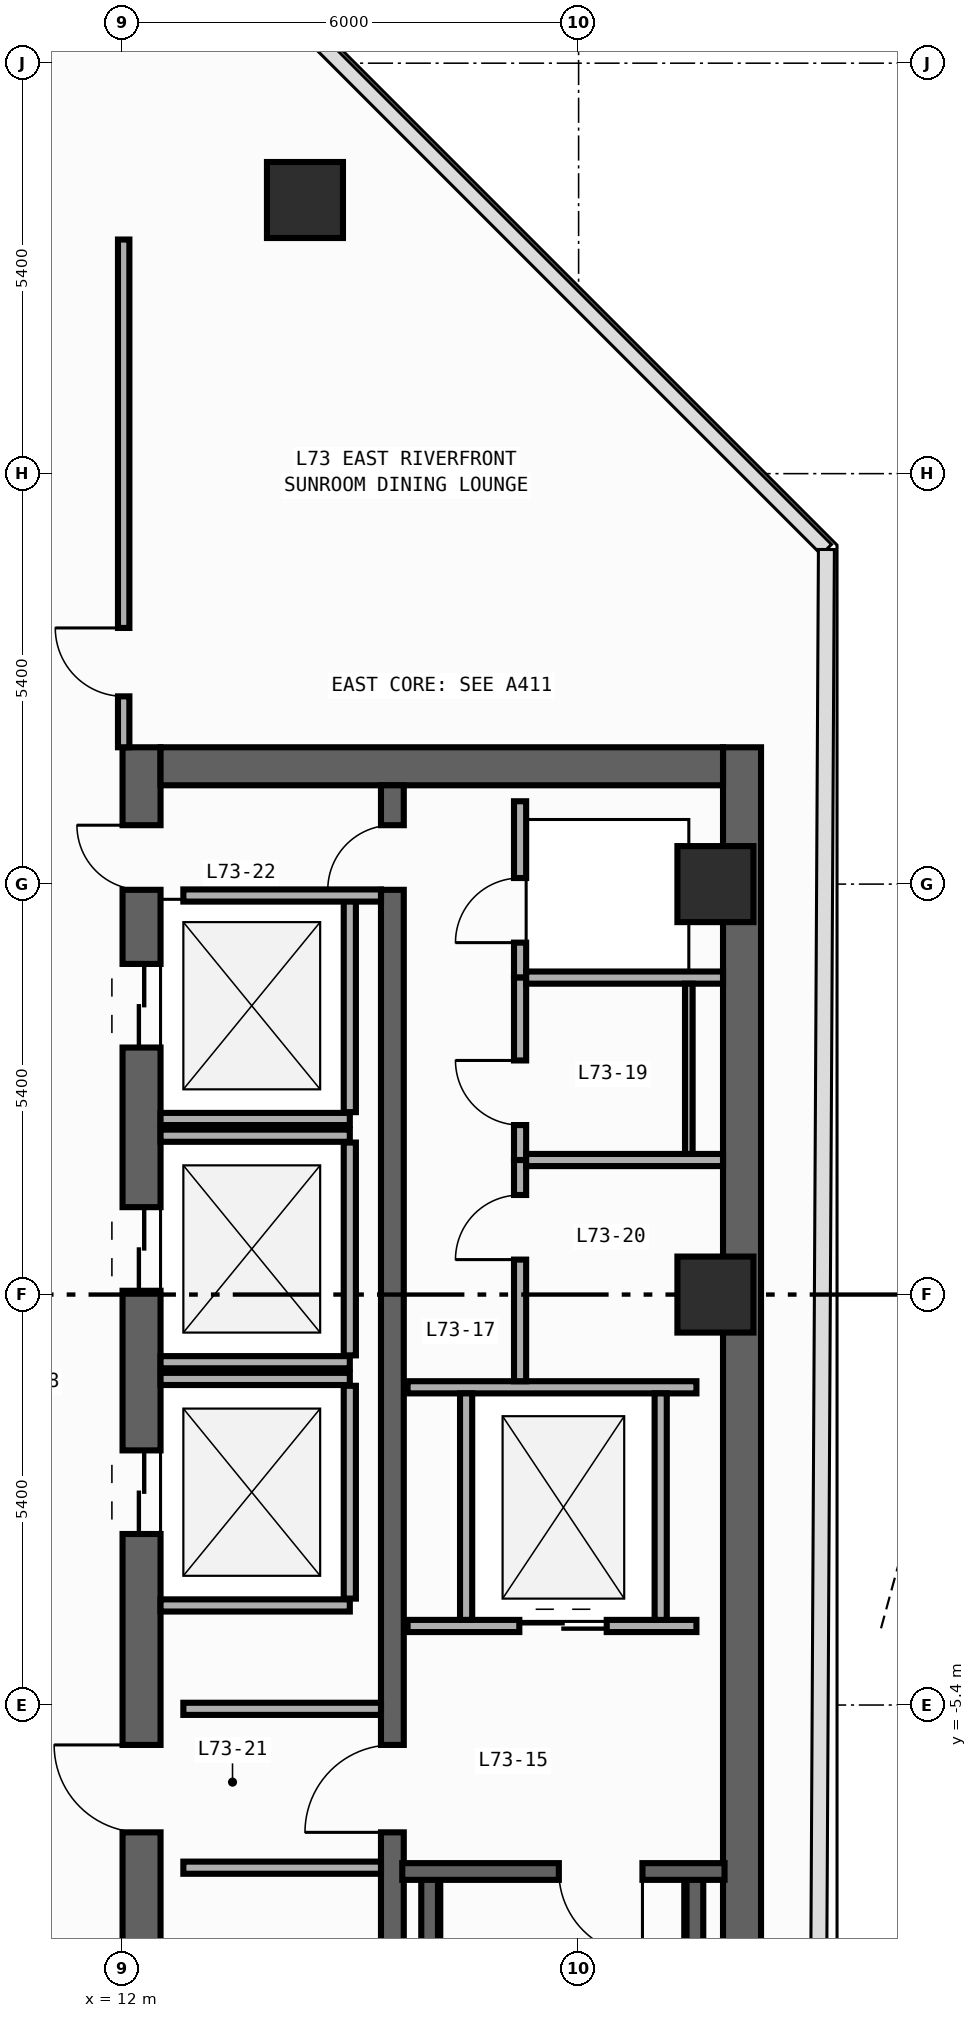
"""IFC4 building model, lengths in metres.
Left out: names, types, materials, properties, quantities, classifications, styles, units other than length and angle.
Written with IfcOpenShell. Run it as: python <this file> out.ifc"""

import sys

from ifc_helpers import new_model, si_unit, direction, frame, frame_2d, origin, origin_2d, place, context, subcontext, project, spatial, rectangle, circle, extrude, element, fill, save


model = new_model("IFC4")
c1 = context("Model", 3, precision=1e-05, world=origin(), true_north=direction((0.0, 1.0)))
c2 = subcontext(c1, "Body", "Model", "MODEL_VIEW")
j1 = project(units=[si_unit("LENGTHUNIT", "METRE"), si_unit("PLANEANGLEUNIT", "RADIAN")], contexts=[c1])
p1 = place(None, origin())
s1 = spatial("IfcSite", under=j1, at=p1, CompositionType="ELEMENT")
p2 = place(p1, origin())
s2 = spatial("IfcBuilding", under=s1, at=p2, CompositionType="ELEMENT")
p3 = place(p2, frame((0.0, 0.0, 304.2)))
s3 = spatial("IfcBuildingStorey", under=s2, at=p3, CompositionType="ELEMENT", Elevation=304.2)
p4 = place(p3, frame((12.25, -19.8, 0.0), z_axis=(0.0, 0.0, 1.0), x_axis=(0.0, 1.0, 0.0)))
e1 = element("IfcWall", 1, at=p4, inside=s3, PredefinedType="SHEAR", context=c2, shape_type="SweptSolid", body=[
    extrude(rectangle(XDim=27.0, YDim=0.5, at=frame_2d((13.5, 0.0))), origin(), (0.0, 0.0, 1.0), 3.54),
])
p5 = place(p4, frame((23.05, 0.0, 0.0)))
e2 = element("IfcOpeningElement", 2, at=p5, cuts=e1, PredefinedType="OPENING", context=c2, shape_type="SweptSolid", body=[
    extrude(rectangle(XDim=1.1, YDim=2.2, at=frame_2d((0.55, 1.1))), frame((0.0, 0.26, 0.0), z_axis=(0.0, -1.0, 0.0), x_axis=(1.0, 0.0, 0.0)), (0.0, 0.0, 1.0), 0.52),
])
p6 = place(p4, frame((19.85, 0.0, 0.0)))
e3 = element("IfcOpeningElement", 3, at=p6, cuts=e1, PredefinedType="OPENING", context=c2, shape_type="SweptSolid", body=[
    extrude(rectangle(XDim=1.1, YDim=2.2, at=frame_2d((0.55, 1.1))), frame((0.0, 0.26, 0.0), z_axis=(0.0, -1.0, 0.0), x_axis=(1.0, 0.0, 0.0)), (0.0, 0.0, 1.0), 0.52),
])
p7 = place(p4, frame((16.65, 0.0, 0.0)))
e4 = element("IfcOpeningElement", 4, at=p7, cuts=e1, PredefinedType="OPENING", context=c2, shape_type="SweptSolid", body=[
    extrude(rectangle(XDim=1.1, YDim=2.2, at=frame_2d((0.55, 1.1))), frame((0.0, 0.26, 0.0), z_axis=(0.0, -1.0, 0.0), x_axis=(1.0, 0.0, 0.0)), (0.0, 0.0, 1.0), 0.52),
])
p8 = place(p4, frame((10.175, 0.0, 0.0)))
e5 = element("IfcOpeningElement", 5, at=p8, cuts=e1, PredefinedType="OPENING", context=c2, shape_type="SweptSolid", body=[
    extrude(rectangle(XDim=0.85, YDim=2.1, at=frame_2d((0.425, 1.05))), frame((0.0, 0.26, 0.0), z_axis=(0.0, -1.0, 0.0), x_axis=(1.0, 0.0, 0.0)), (0.0, 0.0, 1.0), 0.52),
])
p9 = place(p4, frame((12.725, 0.0, 0.0)))
e6 = element("IfcOpeningElement", 6, at=p9, cuts=e1, PredefinedType="OPENING", context=c2, shape_type="SweptSolid", body=[
    extrude(rectangle(XDim=1.15, YDim=2.2, at=frame_2d((0.575, 1.1))), frame((0.0, 0.26, 0.0), z_axis=(0.0, -1.0, 0.0), x_axis=(1.0, 0.0, 0.0)), (0.0, 0.0, 1.0), 0.52),
])
p10 = place(p4, frame((25.125, 0.0, 0.0)))
e7 = element("IfcOpeningElement", 7, at=p10, cuts=e1, PredefinedType="OPENING", context=c2, shape_type="SweptSolid", body=[
    extrude(rectangle(XDim=0.85, YDim=2.1, at=frame_2d((0.425, 1.05))), frame((0.0, 0.26, 0.0), z_axis=(0.0, -1.0, 0.0), x_axis=(1.0, 0.0, 0.0)), (0.0, 0.0, 1.0), 0.52),
])
p11 = place(p3, frame((20.15, -19.8, 0.0), z_axis=(0.0, 0.0, 1.0), x_axis=(0.0, 1.0, 0.0)))
e8 = element("IfcWall", 8, at=p11, inside=s3, PredefinedType="SHEAR", context=c2, shape_type="SweptSolid", body=[
    extrude(rectangle(XDim=27.0, YDim=0.5, at=frame_2d((13.5, 0.0))), origin(), (0.0, 0.0, 1.0), 3.54),
])
p12 = place(p3, frame((12.5, 6.95, 0.0), z_axis=(0.0, 0.0, 1.0), x_axis=(1.0, 0.0, 0.0)))
e9 = element("IfcWall", 9, at=p12, inside=s3, PredefinedType="SHEAR", context=c2, shape_type="SweptSolid", body=[
    extrude(rectangle(XDim=7.4, YDim=0.5, at=frame_2d((3.7, 0.0))), origin(), (0.0, 0.0, 1.0), 3.54),
])
p13 = place(p3, frame((15.55, -19.3, 0.0), z_axis=(0.0, 0.0, 1.0), x_axis=(0.0, 1.0, 0.0)))
e10 = element("IfcWall", 10, at=p13, inside=s3, PredefinedType="SHEAR", context=c2, shape_type="SweptSolid", body=[
    extrude(rectangle(XDim=26.0, YDim=0.3, at=frame_2d((13.0, 0.0))), origin(), (0.0, 0.0, 1.0), 3.54),
])
p14 = place(p13, frame((12.225, 0.0, 0.0)))
e11 = element("IfcOpeningElement", 11, at=p14, cuts=e10, PredefinedType="OPENING", context=c2, shape_type="SweptSolid", body=[
    extrude(rectangle(XDim=1.15, YDim=2.2, at=frame_2d((0.575, 1.1))), frame((0.0, 0.16, 0.0), z_axis=(0.0, -1.0, 0.0), x_axis=(1.0, 0.0, 0.0)), (0.0, 0.0, 1.0), 0.32),
])
p15 = place(p13, frame((24.625, 0.0, 0.0)))
e12 = element("IfcOpeningElement", 12, at=p15, cuts=e10, PredefinedType="OPENING", context=c2, shape_type="SweptSolid", body=[
    extrude(rectangle(XDim=0.85, YDim=2.1, at=frame_2d((0.425, 1.05))), frame((0.0, 0.16, 0.0), z_axis=(0.0, -1.0, 0.0), x_axis=(1.0, 0.0, 0.0)), (0.0, 0.0, 1.0), 0.32),
])
for number, where, z_axis, x_axis in (
    (13, (16.04, -19.01, 0.0), (0.0, 0.0, 1.0), (0.0, 1.0, 0.0)),
    (14, (19.53, -19.01, 0.0), (0.0, 0.0, 1.0), (0.0, 1.0, 0.0)),
):
    element("IfcWall", number, at=place(p3, frame(where, z_axis=z_axis, x_axis=x_axis)), inside=s3, PredefinedType="SHEAR", context=c2, shape_type="SweptSolid", body=[
        extrude(rectangle(XDim=11.42, YDim=0.22, at=frame_2d((5.71, 0.0))), origin(), (0.0, 0.0, 1.0), 3.54),
    ])
p16 = place(p3, frame((19.92, -7.59, 0.0), z_axis=(0.0, 0.0, 1.0), x_axis=(-1.0, 0.0, 0.0)))
e15 = element("IfcWall", 15, at=p16, inside=s3, PredefinedType="SHEAR", context=c2, shape_type="SweptSolid", body=[
    extrude(rectangle(XDim=4.24, YDim=0.22, at=frame_2d((2.12, 0.0))), origin(), (0.0, 0.0, 1.0), 3.54),
])
p17 = place(p16, frame((1.08, 0.0, 0.0)))
e16 = element("IfcOpeningElement", 16, at=p17, cuts=e15, PredefinedType="OPENING", context=c2, shape_type="SweptSolid", body=[
    extrude(rectangle(XDim=1.1, YDim=2.2, at=frame_2d((0.55, 1.1))), frame((0.0, 0.12, 0.0), z_axis=(0.0, -1.0, 0.0), x_axis=(1.0, 0.0, 0.0)), (0.0, 0.0, 1.0), 0.24),
])
for number, where, z_axis, x_axis in (
    (17, (14.4, 14.4, 0.0), (0.0, 0.0, 1.0), (1.0, 0.0, 0.0)),
    (18, (19.8, 0.0, 0.0), (0.0, 0.0, 1.0), (1.0, 0.0, 0.0)),
    (19, (19.8, 5.4, 0.0), (0.0, 0.0, 1.0), (1.0, 0.0, 0.0)),
):
    element("IfcColumn", number, at=place(p3, frame(where, z_axis=z_axis, x_axis=x_axis)), inside=s3, PredefinedType="COLUMN", context=c2, shape_type="SweptSolid", body=[
        extrude(circle(Radius=0.5, at=origin_2d()), origin(), (0.0, 0.0, 1.0), 3.8),
    ])
p18 = place(p3, frame((12.5, 2.31, 0.0), z_axis=(0.0, 0.0, 1.0), x_axis=(1.0, 0.0, 0.0)))
e20 = element("IfcWall", 20, at=p18, inside=s3, PredefinedType="STANDARD", context=c2, shape_type="SweptSolid", body=[
    extrude(rectangle(XDim=2.49, YDim=0.16, at=frame_2d((1.245, 0.0))), origin(), (0.0, 0.0, 1.0), 3.54),
])
p19 = place(p3, frame((14.99, 2.4, 0.0), z_axis=(0.0, 0.0, 1.0), x_axis=(0.0, 1.0, 0.0)))
e21 = element("IfcWall", 21, at=p19, inside=s3, PredefinedType="STANDARD", context=c2, shape_type="SweptSolid", body=[
    extrude(rectangle(XDim=2.8, YDim=0.16, at=frame_2d((1.4, 0.0))), origin(), (0.0, 0.0, 1.0), 3.54),
])
for number, where, z_axis, x_axis in (
    (22, (12.5, -0.89, 0.0), (0.0, 0.0, 1.0), (1.0, 0.0, 0.0)),
    (23, (12.5, 2.09, 0.0), (0.0, 0.0, 1.0), (1.0, 0.0, 0.0)),
):
    element("IfcWall", number, at=place(p3, frame(where, z_axis=z_axis, x_axis=x_axis)), inside=s3, PredefinedType="STANDARD", context=c2, shape_type="SweptSolid", body=[
        extrude(rectangle(XDim=2.49, YDim=0.16, at=frame_2d((1.245, 0.0))), origin(), (0.0, 0.0, 1.0), 3.54),
    ])
p20 = place(p3, frame((14.99, -0.8, 0.0), z_axis=(0.0, 0.0, 1.0), x_axis=(0.0, 1.0, 0.0)))
e24 = element("IfcWall", 24, at=p20, inside=s3, PredefinedType="STANDARD", context=c2, shape_type="SweptSolid", body=[
    extrude(rectangle(XDim=2.8, YDim=0.16, at=frame_2d((1.4, 0.0))), origin(), (0.0, 0.0, 1.0), 3.54),
])
for number, where, z_axis, x_axis in (
    (25, (12.5, -4.09, 0.0), (0.0, 0.0, 1.0), (1.0, 0.0, 0.0)),
    (26, (12.5, -1.11, 0.0), (0.0, 0.0, 1.0), (1.0, 0.0, 0.0)),
):
    element("IfcWall", number, at=place(p3, frame(where, z_axis=z_axis, x_axis=x_axis)), inside=s3, PredefinedType="STANDARD", context=c2, shape_type="SweptSolid", body=[
        extrude(rectangle(XDim=2.49, YDim=0.16, at=frame_2d((1.245, 0.0))), origin(), (0.0, 0.0, 1.0), 3.54),
    ])
p21 = place(p3, frame((14.99, -4.0, 0.0), z_axis=(0.0, 0.0, 1.0), x_axis=(0.0, 1.0, 0.0)))
e27 = element("IfcWall", 27, at=p21, inside=s3, PredefinedType="STANDARD", context=c2, shape_type="SweptSolid", body=[
    extrude(rectangle(XDim=2.8, YDim=0.16, at=frame_2d((1.4, 0.0))), origin(), (0.0, 0.0, 1.0), 3.54),
])
p22 = place(p3, frame((15.75, -4.36, 0.0), z_axis=(0.0, 0.0, 1.0), x_axis=(1.0, 0.0, 0.0)))
e28 = element("IfcWall", 28, at=p22, inside=s3, PredefinedType="STANDARD", context=c2, shape_type="SweptSolid", body=[
    extrude(rectangle(XDim=3.8, YDim=0.16, at=frame_2d((1.9, 0.0))), origin(), (0.0, 0.0, 1.0), 3.54),
])
p23 = place(p22, frame((1.47, 0.0, 0.0)))
e29 = element("IfcOpeningElement", 29, at=p23, cuts=e28, PredefinedType="OPENING", context=c2, shape_type="SweptSolid", body=[
    extrude(rectangle(XDim=1.15, YDim=2.2, at=frame_2d((0.575, 1.1))), frame((0.0, 0.09, 0.0), z_axis=(0.0, -1.0, 0.0), x_axis=(1.0, 0.0, 0.0)), (0.0, 0.0, 1.0), 0.18),
])
p24 = place(p3, frame((15.75, -1.22, 0.0), z_axis=(0.0, 0.0, 1.0), x_axis=(1.0, 0.0, 0.0)))
e30 = element("IfcWall", 30, at=p24, inside=s3, PredefinedType="STANDARD", context=c2, shape_type="SweptSolid", body=[
    extrude(rectangle(XDim=3.8, YDim=0.16, at=frame_2d((1.9, 0.0))), origin(), (0.0, 0.0, 1.0), 3.54),
])
for number, where, z_axis, x_axis in (
    (31, (16.52, -4.28, 0.0), (0.0, 0.0, 1.0), (0.0, 1.0, 0.0)),
    (32, (19.08, -4.28, 0.0), (0.0, 0.0, 1.0), (0.0, 1.0, 0.0)),
):
    element("IfcWall", number, at=place(p3, frame(where, z_axis=z_axis, x_axis=x_axis)), inside=s3, PredefinedType="STANDARD", context=c2, shape_type="SweptSolid", body=[
        extrude(rectangle(XDim=2.98, YDim=0.16, at=frame_2d((1.49, 0.0))), origin(), (0.0, 0.0, 1.0), 3.54),
    ])
for number, where, z_axis, x_axis in (
    (33, (12.8, -5.45, 0.0), (0.0, 0.0, 1.0), (1.0, 0.0, 0.0)),
    (34, (12.8, -7.54, 0.0), (0.0, 0.0, 1.0), (1.0, 0.0, 0.0)),
    (35, (12.8, 5.25, 0.0), (0.0, 0.0, 1.0), (1.0, 0.0, 0.0)),
):
    element("IfcWall", number, at=place(p3, frame(where, z_axis=z_axis, x_axis=x_axis)), inside=s3, PredefinedType="STANDARD", context=c2, shape_type="SweptSolid", body=[
        extrude(rectangle(XDim=2.6, YDim=0.16, at=frame_2d((1.3, 0.0))), origin(), (0.0, 0.0, 1.0), 3.54),
    ])
p25 = place(p3, frame((17.23, 4.17, 0.0), z_axis=(0.0, 0.0, 1.0), x_axis=(0.0, 1.0, 0.0)))
e36 = element("IfcWall", 36, at=p25, inside=s3, PredefinedType="PARTITIONING", context=c2, shape_type="SweptSolid", body=[
    extrude(rectangle(XDim=2.32, YDim=0.16, at=frame_2d((1.16, 0.0))), origin(), (0.0, 0.0, 1.0), 3.54),
])
p26 = place(p25, frame((0.46, 0.0, 0.0)))
e37 = element("IfcOpeningElement", 37, at=p26, cuts=e36, PredefinedType="OPENING", context=c2, shape_type="SweptSolid", body=[
    extrude(rectangle(XDim=0.85, YDim=2.1, at=frame_2d((0.425, 1.05))), frame((0.0, 0.09, 0.0), z_axis=(0.0, -1.0, 0.0), x_axis=(1.0, 0.0, 0.0)), (0.0, 0.0, 1.0), 0.18),
])
p27 = place(p3, frame((17.23, 1.77, 0.0), z_axis=(0.0, 0.0, 1.0), x_axis=(0.0, 1.0, 0.0)))
e38 = element("IfcWall", 38, at=p27, inside=s3, PredefinedType="PARTITIONING", context=c2, shape_type="SweptSolid", body=[
    extrude(rectangle(XDim=2.4, YDim=0.16, at=frame_2d((1.2, 0.0))), origin(), (0.0, 0.0, 1.0), 3.54),
])
p28 = place(p27, frame((0.46, 0.0, 0.0)))
e39 = element("IfcOpeningElement", 39, at=p28, cuts=e38, PredefinedType="OPENING", context=c2, shape_type="SweptSolid", body=[
    extrude(rectangle(XDim=0.85, YDim=2.1, at=frame_2d((0.425, 1.05))), frame((0.0, 0.09, 0.0), z_axis=(0.0, -1.0, 0.0), x_axis=(1.0, 0.0, 0.0)), (0.0, 0.0, 1.0), 0.18),
])
p29 = place(p3, frame((17.23, -1.14, 0.0), z_axis=(0.0, 0.0, 1.0), x_axis=(0.0, 1.0, 0.0)))
e40 = element("IfcWall", 40, at=p29, inside=s3, PredefinedType="PARTITIONING", context=c2, shape_type="SweptSolid", body=[
    extrude(rectangle(XDim=2.91, YDim=0.16, at=frame_2d((1.455, 0.0))), origin(), (0.0, 0.0, 1.0), 3.54),
])
p30 = place(p29, frame((1.6, 0.0, 0.0)))
e41 = element("IfcOpeningElement", 41, at=p30, cuts=e40, PredefinedType="OPENING", context=c2, shape_type="SweptSolid", body=[
    extrude(rectangle(XDim=0.85, YDim=2.1, at=frame_2d((0.425, 1.05))), frame((0.0, 0.09, 0.0), z_axis=(0.0, -1.0, 0.0), x_axis=(1.0, 0.0, 0.0)), (0.0, 0.0, 1.0), 0.18),
])
for number, where, z_axis, x_axis in (
    (42, (17.31, 4.17, 0.0), (0.0, 0.0, 1.0), (1.0, 0.0, 0.0)),
    (43, (17.31, 1.77, 0.0), (0.0, 0.0, 1.0), (1.0, 0.0, 0.0)),
):
    element("IfcWall", number, at=place(p3, frame(where, z_axis=z_axis, x_axis=x_axis)), inside=s3, PredefinedType="PARTITIONING", context=c2, shape_type="SweptSolid", body=[
        extrude(rectangle(XDim=2.59, YDim=0.16, at=frame_2d((1.295, 0.0))), origin(), (0.0, 0.0, 1.0), 3.54),
    ])
p31 = place(p3, frame((12.015, 7.2, 0.0), z_axis=(0.0, 0.0, 1.0), x_axis=(0.0, 1.0, 0.0)))
e44 = element("IfcWall", 44, at=p31, inside=s3, PredefinedType="PARTITIONING", context=c2, shape_type="SweptSolid", body=[
    extrude(rectangle(XDim=6.68, YDim=0.15, at=frame_2d((3.34, 0.0))), origin(), (0.0, 0.0, 1.0), 3.54),
])
p32 = place(p31, frame((0.67, 0.0, 0.0)))
e45 = element("IfcOpeningElement", 45, at=p32, cuts=e44, PredefinedType="OPENING", context=c2, shape_type="SweptSolid", body=[
    extrude(rectangle(XDim=0.9, YDim=2.15, at=frame_2d((0.45, 1.075))), frame((0.0, 0.085, 0.0), z_axis=(0.0, -1.0, 0.0), x_axis=(1.0, 0.0, 0.0)), (0.0, 0.0, 1.0), 0.17),
])
p33 = place(p3, frame((19.45, 4.09, 0.0), z_axis=(0.0, 0.0, 1.0), x_axis=(0.0, -1.0, 0.0)))
e46 = element("IfcWall", 46, at=p33, inside=s3, PredefinedType="PARTITIONING", context=c2, shape_type="SweptSolid", body=[
    extrude(rectangle(XDim=2.24, YDim=0.1, at=frame_2d((1.12, 0.0))), origin(), (0.0, 0.0, 1.0), 3.54),
])
p34 = place(p17, origin())
e47 = element("IfcDoor", 47, at=p34, inside=s3, OperationType="SINGLE_SWING_LEFT", PredefinedType="DOOR", context=c2, shape_type="SweptSolid", body=[
    extrude(rectangle(XDim=1.1, YDim=2.2, at=frame_2d((0.55, 1.1))), frame((0.0, 0.025, 0.0), z_axis=(0.0, -1.0, 0.0), x_axis=(1.0, 0.0, 0.0)), (0.0, 0.0, 1.0), 0.05),
])
fill(e16, e47)
p35 = place(p5, origin())
e48 = element("IfcDoor", 48, at=p35, inside=s3, OperationType="DOUBLE_DOOR_SLIDING", PredefinedType="DOOR", context=c2, shape_type="SweptSolid", body=[
    extrude(rectangle(XDim=1.1, YDim=2.2, at=frame_2d((0.55, 1.1))), frame((0.0, 0.025, 0.0), z_axis=(0.0, -1.0, 0.0), x_axis=(1.0, 0.0, 0.0)), (0.0, 0.0, 1.0), 0.05),
])
fill(e2, e48)
p36 = place(p6, origin())
e49 = element("IfcDoor", 49, at=p36, inside=s3, OperationType="DOUBLE_DOOR_SLIDING", PredefinedType="DOOR", context=c2, shape_type="SweptSolid", body=[
    extrude(rectangle(XDim=1.1, YDim=2.2, at=frame_2d((0.55, 1.1))), frame((0.0, 0.025, 0.0), z_axis=(0.0, -1.0, 0.0), x_axis=(1.0, 0.0, 0.0)), (0.0, 0.0, 1.0), 0.05),
])
fill(e3, e49)
p37 = place(p7, origin())
e50 = element("IfcDoor", 50, at=p37, inside=s3, OperationType="DOUBLE_DOOR_SLIDING", PredefinedType="DOOR", context=c2, shape_type="SweptSolid", body=[
    extrude(rectangle(XDim=1.1, YDim=2.2, at=frame_2d((0.55, 1.1))), frame((0.0, 0.025, 0.0), z_axis=(0.0, -1.0, 0.0), x_axis=(1.0, 0.0, 0.0)), (0.0, 0.0, 1.0), 0.05),
])
fill(e4, e50)
p38 = place(p9, origin())
e51 = element("IfcDoor", 51, at=p38, inside=s3, OperationType="SINGLE_SWING_RIGHT", PredefinedType="DOOR", context=c2, shape_type="SweptSolid", body=[
    extrude(rectangle(XDim=1.15, YDim=2.2, at=frame_2d((0.575, 1.1))), frame((0.0, 0.025, 0.0), z_axis=(0.0, -1.0, 0.0), x_axis=(1.0, 0.0, 0.0)), (0.0, 0.0, 1.0), 0.05),
])
fill(e6, e51)
p39 = place(p14, origin())
e52 = element("IfcDoor", 52, at=p39, inside=s3, OperationType="SINGLE_SWING_LEFT", PredefinedType="DOOR", context=c2, shape_type="SweptSolid", body=[
    extrude(rectangle(XDim=1.15, YDim=2.2, at=frame_2d((0.575, 1.1))), frame((0.0, 0.025, 0.0), z_axis=(0.0, -1.0, 0.0), x_axis=(1.0, 0.0, 0.0)), (0.0, 0.0, 1.0), 0.05),
])
fill(e11, e52)
p40 = place(p10, origin())
e53 = element("IfcDoor", 53, at=p40, inside=s3, OperationType="SINGLE_SWING_RIGHT", PredefinedType="DOOR", context=c2, shape_type="SweptSolid", body=[
    extrude(rectangle(XDim=0.85, YDim=2.1, at=frame_2d((0.425, 1.05))), frame((0.0, 0.025, 0.0), z_axis=(0.0, -1.0, 0.0), x_axis=(1.0, 0.0, 0.0)), (0.0, 0.0, 1.0), 0.05),
])
fill(e7, e53)
p41 = place(p15, origin())
e54 = element("IfcDoor", 54, at=p41, inside=s3, OperationType="SINGLE_SWING_LEFT", PredefinedType="DOOR", context=c2, shape_type="SweptSolid", body=[
    extrude(rectangle(XDim=0.85, YDim=2.1, at=frame_2d((0.425, 1.05))), frame((0.0, 0.025, 0.0), z_axis=(0.0, -1.0, 0.0), x_axis=(1.0, 0.0, 0.0)), (0.0, 0.0, 1.0), 0.05),
])
fill(e12, e54)
p42 = place(p23, origin())
e55 = element("IfcDoor", 55, at=p42, inside=s3, OperationType="DOUBLE_DOOR_SLIDING", PredefinedType="DOOR", context=c2, shape_type="SweptSolid", body=[
    extrude(rectangle(XDim=1.15, YDim=2.2, at=frame_2d((0.575, 1.1))), frame((0.0, 0.025, 0.0), z_axis=(0.0, -1.0, 0.0), x_axis=(1.0, 0.0, 0.0)), (0.0, 0.0, 1.0), 0.05),
])
fill(e29, e55)
p43 = place(p26, origin())
e56 = element("IfcDoor", 56, at=p43, inside=s3, OperationType="SINGLE_SWING_LEFT", PredefinedType="DOOR", context=c2, shape_type="SweptSolid", body=[
    extrude(rectangle(XDim=0.85, YDim=2.1, at=frame_2d((0.425, 1.05))), frame((0.0, 0.025, 0.0), z_axis=(0.0, -1.0, 0.0), x_axis=(1.0, 0.0, 0.0)), (0.0, 0.0, 1.0), 0.05),
])
fill(e37, e56)
p44 = place(p28, origin())
e57 = element("IfcDoor", 57, at=p44, inside=s3, OperationType="SINGLE_SWING_RIGHT", PredefinedType="DOOR", context=c2, shape_type="SweptSolid", body=[
    extrude(rectangle(XDim=0.85, YDim=2.1, at=frame_2d((0.425, 1.05))), frame((0.0, 0.025, 0.0), z_axis=(0.0, -1.0, 0.0), x_axis=(1.0, 0.0, 0.0)), (0.0, 0.0, 1.0), 0.05),
])
fill(e39, e57)
p45 = place(p30, origin())
e58 = element("IfcDoor", 58, at=p45, inside=s3, OperationType="SINGLE_SWING_LEFT", PredefinedType="DOOR", context=c2, shape_type="SweptSolid", body=[
    extrude(rectangle(XDim=0.85, YDim=2.1, at=frame_2d((0.425, 1.05))), frame((0.0, 0.025, 0.0), z_axis=(0.0, -1.0, 0.0), x_axis=(1.0, 0.0, 0.0)), (0.0, 0.0, 1.0), 0.05),
])
fill(e41, e58)
p46 = place(p32, origin())
e59 = element("IfcDoor", 59, at=p46, inside=s3, OperationType="SINGLE_SWING_RIGHT", PredefinedType="DOOR", context=c2, shape_type="SweptSolid", body=[
    extrude(rectangle(XDim=0.9, YDim=2.15, at=frame_2d((0.45, 1.075))), frame((0.0, 0.025, 0.0), z_axis=(0.0, -1.0, 0.0), x_axis=(1.0, 0.0, 0.0)), (0.0, 0.0, 1.0), 0.05),
])
fill(e45, e59)
save(model, sys.argv[1])
